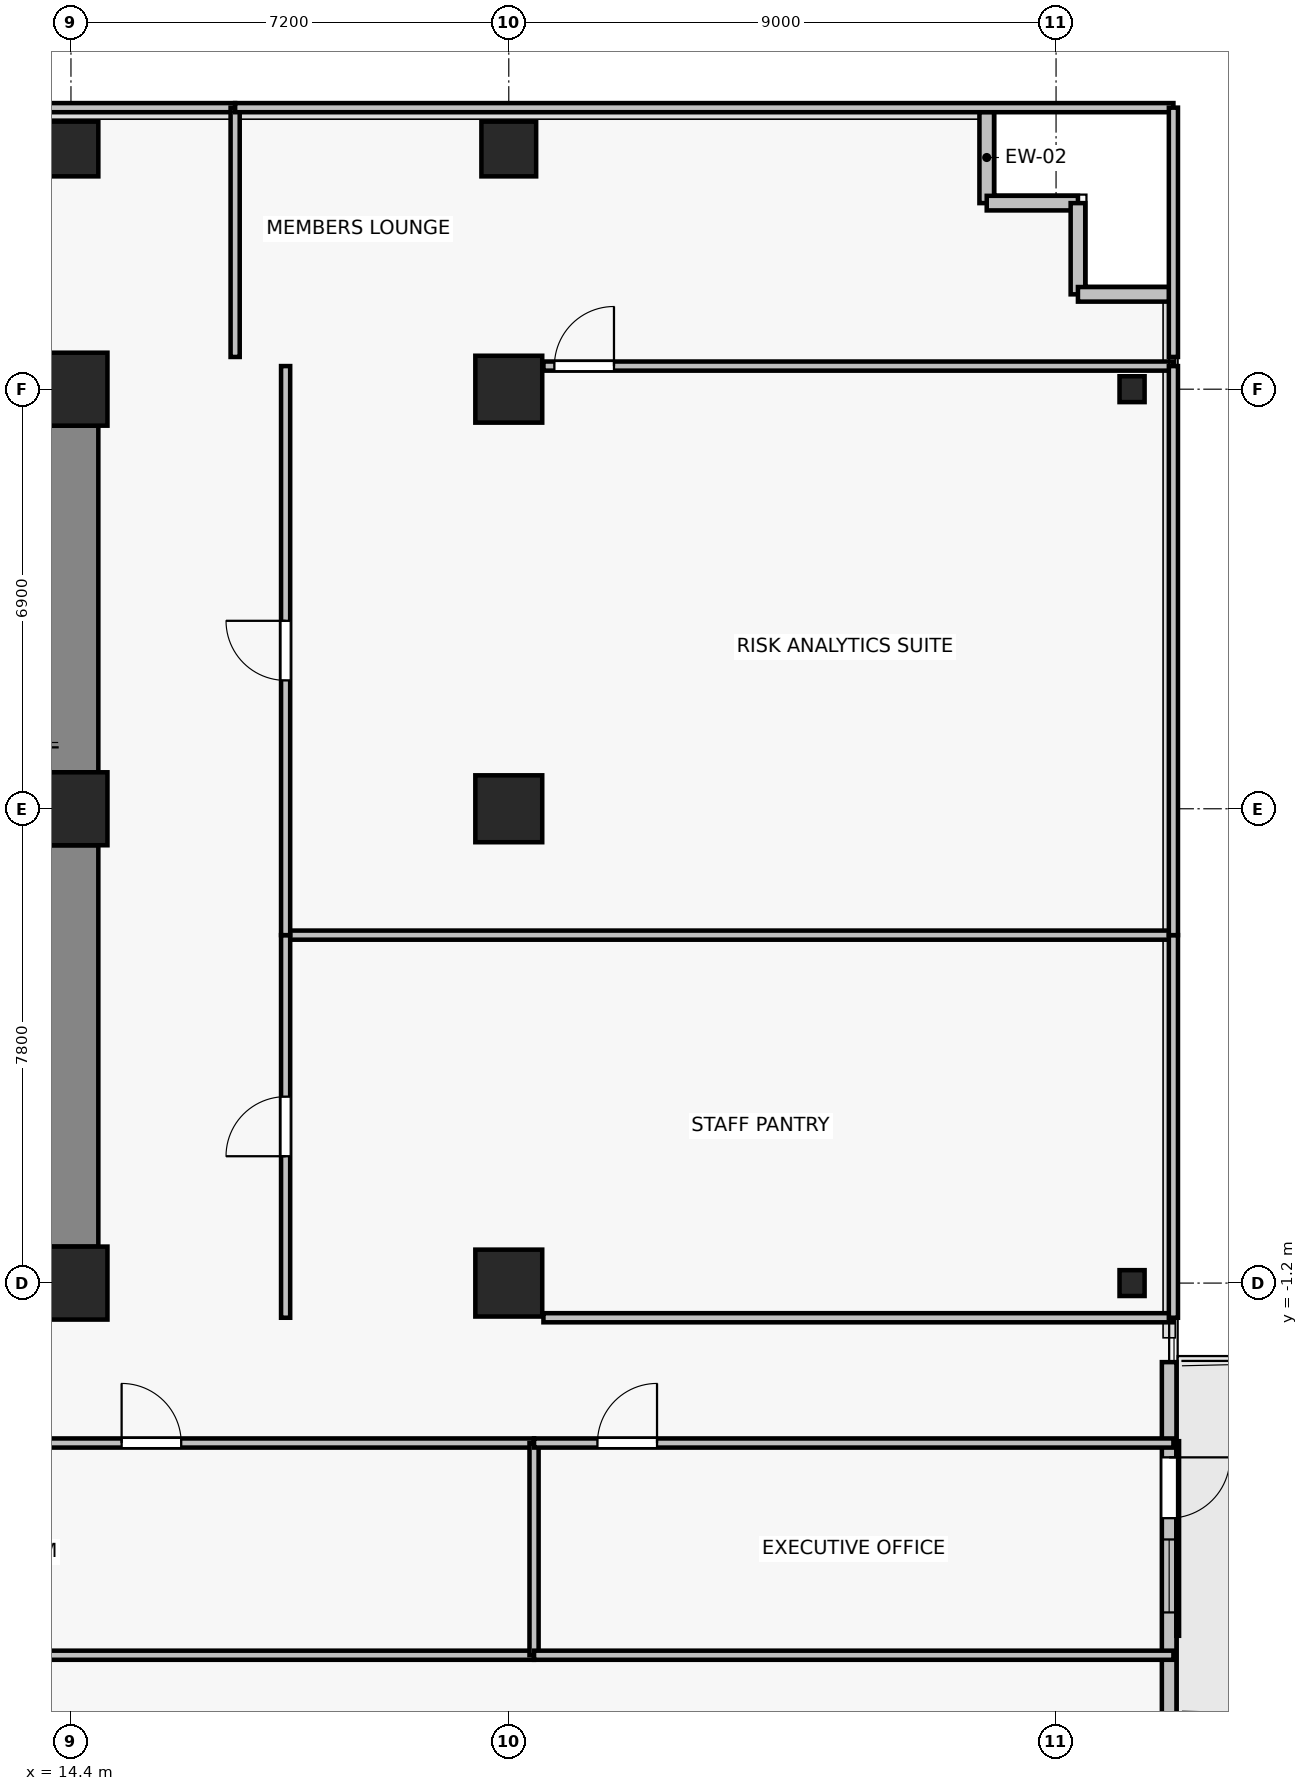
"""IFC4 building model, lengths in metres.
Left out: names, types, materials, properties, quantities, classifications, styles, units other than length and angle.
Written with IfcOpenShell. Run it as: python <this file> out.ifc"""

import sys

from ifc_helpers import new_model, si_unit, direction, frame, frame_2d, origin, origin_2d, place, context, subcontext, project, spatial, rectangle, i_section, extrude, source, transform, mapped, element, fill, save


model = new_model("IFC4")
c1 = context("Model", 3, precision=1e-05, world=origin(), true_north=direction((0.0, 1.0)))
c2 = subcontext(c1, "Body", "Model", "MODEL_VIEW")
j1 = project(units=[si_unit("LENGTHUNIT", "METRE"), si_unit("PLANEANGLEUNIT", "RADIAN")], contexts=[c1])
p1 = place(None, origin())
s1 = spatial("IfcSite", under=j1, at=p1, CompositionType="ELEMENT")
p2 = place(p1, origin())
s2 = spatial("IfcBuilding", under=s1, at=p2, CompositionType="ELEMENT")
p3 = place(p2, frame((0.0, 0.0, 70.3)))
s3 = spatial("IfcBuildingStorey", under=s2, at=p3, CompositionType="ELEMENT", Elevation=70.3)
for number, where, z_axis, x_axis in (
    (1, (14.4, -1.2, 0.0), (0.0, 0.0, 1.0), (1.0, 0.0, 0.0)),
    (2, (14.4, 6.6, 0.0), (0.0, 0.0, 1.0), (1.0, 0.0, 0.0)),
    (3, (14.4, 13.5, 0.0), (0.0, 0.0, 1.0), (1.0, 0.0, 0.0)),
):
    element("IfcColumn", number, at=place(p3, frame(where, z_axis=z_axis, x_axis=x_axis)), inside=s3, PredefinedType="COLUMN", context=c2, shape_type="SweptSolid", body=[
        extrude(rectangle(XDim=1.2, YDim=1.2, at=origin_2d()), origin(), (0.0, 0.0, 1.0), 3.3),
    ])
for number, where, z_axis, x_axis in (
    (4, (21.6, -1.2, 0.0), (0.0, 0.0, 1.0), (1.0, 0.0, 0.0)),
    (5, (21.6, 6.6, 0.0), (0.0, 0.0, 1.0), (1.0, 0.0, 0.0)),
    (6, (21.6, 13.5, 0.0), (0.0, 0.0, 1.0), (1.0, 0.0, 0.0)),
):
    element("IfcColumn", number, at=place(p3, frame(where, z_axis=z_axis, x_axis=x_axis)), inside=s3, PredefinedType="COLUMN", context=c2, shape_type="SweptSolid", body=[
        extrude(rectangle(XDim=1.1, YDim=1.1, at=origin_2d()), origin(), (0.0, 0.0, 1.0), 3.3),
    ])
for number, where, z_axis, x_axis in (
    (7, (14.4, 17.45, 0.0), (0.0, 0.0, 1.0), (1.0, 0.0, 0.0)),
    (8, (21.6, 17.45, 0.0), (0.0, 0.0, 1.0), (1.0, 0.0, 0.0)),
):
    element("IfcColumn", number, at=place(p3, frame(where, z_axis=z_axis, x_axis=x_axis)), inside=s3, PredefinedType="COLUMN", context=c2, shape_type="SweptSolid", body=[
        extrude(rectangle(XDim=0.9, YDim=0.9, at=origin_2d()), origin(), (0.0, 0.0, 1.0), 3.3),
    ])
for number, where, z_axis, x_axis in (
    (9, (31.85, -1.2, 0.0), (0.0, 0.0, 1.0), (1.0, 0.0, 0.0)),
    (10, (31.85, 13.5, 0.0), (0.0, 0.0, 1.0), (1.0, 0.0, 0.0)),
):
    element("IfcColumn", number, at=place(p3, frame(where, z_axis=z_axis, x_axis=x_axis)), inside=s3, PredefinedType="COLUMN", context=c2, shape_type="SweptSolid", body=[
        extrude(i_section(OverallWidth=0.412, OverallDepth=0.425, WebThickness=0.026, FlangeThickness=0.039, FilletRadius=0.015, at=origin_2d()), origin(), (0.0, 0.0, 1.0), 3.3),
    ])
p4 = place(p3, frame((14.4, -0.6, 0.0), z_axis=(0.0, 0.0, 1.0), x_axis=(0.0, 1.0, 0.0)))
e11 = element("IfcWall", 11, at=p4, inside=s3, PredefinedType="SHEAR", context=c2, shape_type="SweptSolid", body=[
    extrude(rectangle(XDim=6.6, YDim=0.9, at=frame_2d((3.3, 0.0))), origin(), (0.0, 0.0, 1.0), 3.075),
])
p5 = place(p3, frame((14.4, 7.2, 0.0), z_axis=(0.0, 0.0, 1.0), x_axis=(0.0, 1.0, 0.0)))
e12 = element("IfcWall", 12, at=p5, inside=s3, PredefinedType="SHEAR", context=c2, shape_type="SweptSolid", body=[
    extrude(rectangle(XDim=5.7, YDim=0.9, at=frame_2d((2.85, 0.0))), origin(), (0.0, 0.0, 1.0), 3.075),
])
p6 = place(p3, frame((32.46, -2.5, 0.0), z_axis=(0.0, 0.0, 1.0), x_axis=(0.0, -1.0, 0.0)))
e13 = element("IfcWall", 13, at=p6, inside=s3, PredefinedType="SOLIDWALL", context=c2, shape_type="SweptSolid", body=[
    extrude(rectangle(XDim=5.8, YDim=0.24, at=frame_2d((2.9, 0.0))), origin(), (0.0, 0.0, 1.0), 3.075),
])
p7 = place(p6, frame((1.566, 0.0, 0.0)))
e14 = element("IfcOpeningElement", 14, at=p7, cuts=e13, PredefinedType="OPENING", context=c2, shape_type="SweptSolid", body=[
    extrude(rectangle(XDim=1.0, YDim=2.2, at=frame_2d((0.5, 1.1))), frame((0.0, 0.13, 0.0), z_axis=(0.0, -1.0, 0.0), x_axis=(1.0, 0.0, 0.0)), (0.0, 0.0, 1.0), 0.26),
])
p8 = place(p6, frame((2.916, 0.0, 0.85)))
e15 = element("IfcOpeningElement", 15, at=p8, cuts=e13, PredefinedType="OPENING", context=c2, shape_type="SweptSolid", body=[
    extrude(rectangle(XDim=1.2, YDim=1.5, at=frame_2d((0.6, 0.75))), frame((0.0, 0.13, 0.0), z_axis=(0.0, -1.0, 0.0), x_axis=(1.0, 0.0, 0.0)), (0.0, 0.0, 1.0), 0.26),
])
for number, where, z_axis, x_axis in (
    (16, (29.46, 16.56, 0.0), (0.0, 0.0, 1.0), (0.0, 1.0, 0.0)),
    (17, (30.96, 16.56, 0.0), (0.0, 0.0, 1.0), (-1.0, 0.0, 0.0)),
    (18, (30.96, 15.06, 0.0), (0.0, 0.0, 1.0), (0.0, 1.0, 0.0)),
    (19, (32.46, 15.06, 0.0), (0.0, 0.0, 1.0), (-1.0, 0.0, 0.0)),
):
    element("IfcWall", number, at=place(p3, frame(where, z_axis=z_axis, x_axis=x_axis)), inside=s3, PredefinedType="SOLIDWALL", context=c2, shape_type="SweptSolid", body=[
        extrude(rectangle(XDim=1.5, YDim=0.24, at=frame_2d((0.75, 0.0))), origin(), (0.0, 0.0, 1.0), 3.075),
    ])
p9 = place(p3, frame((22.015, -7.32, 0.0), z_axis=(0.0, 0.0, 1.0), x_axis=(-1.0, 0.0, 0.0)))
e20 = element("IfcWall", 20, at=p9, inside=s3, PredefinedType="PARTITIONING", context=c2, shape_type="SweptSolid", body=[
    extrude(rectangle(XDim=12.585, YDim=0.15, at=frame_2d((6.293, 0.0))), origin(), (0.0, 0.0, 1.0), 2.465),
])
p10 = place(p9, frame((11.426, 0.0, 0.0)))
e21 = element("IfcOpeningElement", 21, at=p10, cuts=e20, PredefinedType="OPENING", context=c2, shape_type="SweptSolid", body=[
    extrude(rectangle(XDim=0.98, YDim=2.15, at=frame_2d((0.49, 1.075))), frame((0.0, 0.085, 0.0), z_axis=(0.0, -1.0, 0.0), x_axis=(1.0, 0.0, 0.0)), (0.0, 0.0, 1.0), 0.17),
])
p11 = place(p3, frame((9.43, -3.83, 0.0), z_axis=(0.0, 0.0, 1.0), x_axis=(1.0, 0.0, 0.0)))
e22 = element("IfcWall", 22, at=p11, inside=s3, PredefinedType="PARTITIONING", context=c2, shape_type="SweptSolid", body=[
    extrude(rectangle(XDim=12.585, YDim=0.15, at=frame_2d((6.293, 0.0))), origin(), (0.0, 0.0, 1.0), 2.465),
])
p12 = place(p11, frame((5.803, 0.0, 0.0)))
e23 = element("IfcOpeningElement", 23, at=p12, cuts=e22, PredefinedType="OPENING", context=c2, shape_type="SweptSolid", body=[
    extrude(rectangle(XDim=0.98, YDim=2.15, at=frame_2d((0.49, 1.075))), frame((0.0, 0.085, 0.0), z_axis=(0.0, -1.0, 0.0), x_axis=(1.0, 0.0, 0.0)), (0.0, 0.0, 1.0), 0.17),
])
p13 = place(p3, frame((22.015, -3.83, 0.0), z_axis=(0.0, 0.0, 1.0), x_axis=(0.0, -1.0, 0.0)))
e24 = element("IfcWall", 24, at=p13, inside=s3, PredefinedType="PARTITIONING", context=c2, shape_type="SweptSolid", body=[
    extrude(rectangle(XDim=3.49, YDim=0.15, at=frame_2d((1.745, 0.0))), origin(), (0.0, 0.0, 1.0), 2.565),
])
p14 = place(p3, frame((32.53, -7.32, 0.0), z_axis=(0.0, 0.0, 1.0), x_axis=(-1.0, 0.0, 0.0)))
e25 = element("IfcWall", 25, at=p14, inside=s3, PredefinedType="PARTITIONING", context=c2, shape_type="SweptSolid", body=[
    extrude(rectangle(XDim=10.515, YDim=0.15, at=frame_2d((5.257, 0.0))), origin(), (0.0, 0.0, 1.0), 2.465),
])
p15 = place(p3, frame((22.015, -3.83, 0.0), z_axis=(0.0, 0.0, 1.0), x_axis=(1.0, 0.0, 0.0)))
e26 = element("IfcWall", 26, at=p15, inside=s3, PredefinedType="PARTITIONING", context=c2, shape_type="SweptSolid", body=[
    extrude(rectangle(XDim=10.515, YDim=0.15, at=frame_2d((5.257, 0.0))), origin(), (0.0, 0.0, 1.0), 2.465),
])
p16 = place(p15, frame((1.042, 0.0, 0.0)))
e27 = element("IfcOpeningElement", 27, at=p16, cuts=e26, PredefinedType="OPENING", context=c2, shape_type="SweptSolid", body=[
    extrude(rectangle(XDim=0.98, YDim=2.15, at=frame_2d((0.49, 1.075))), frame((0.0, 0.085, 0.0), z_axis=(0.0, -1.0, 0.0), x_axis=(1.0, 0.0, 0.0)), (0.0, 0.0, 1.0), 0.17),
])
p17 = place(p3, frame((32.53, -1.77, 0.0), z_axis=(0.0, 0.0, 1.0), x_axis=(-1.0, 0.0, 0.0)))
e28 = element("IfcWall", 28, at=p17, inside=s3, PredefinedType="PARTITIONING", context=c2, shape_type="SweptSolid", body=[
    extrude(rectangle(XDim=10.36, YDim=0.15, at=frame_2d((5.18, 0.0))), origin(), (0.0, 0.0, 1.0), 2.465),
])
p18 = place(p3, frame((17.93, 4.522, 0.0), z_axis=(0.0, 0.0, 1.0), x_axis=(1.0, 0.0, 0.0)))
e29 = element("IfcWall", 29, at=p18, inside=s3, PredefinedType="PARTITIONING", context=c2, shape_type="SweptSolid", body=[
    extrude(rectangle(XDim=14.6, YDim=0.15, at=frame_2d((7.3, 0.0))), origin(), (0.0, 0.0, 1.0), 2.465),
])
p19 = place(p3, frame((17.93, -1.77, 0.0), z_axis=(0.0, 0.0, 1.0), x_axis=(0.0, 1.0, 0.0)))
e30 = element("IfcWall", 30, at=p19, inside=s3, PredefinedType="PARTITIONING", context=c2, shape_type="SweptSolid", body=[
    extrude(rectangle(XDim=6.292, YDim=0.15, at=frame_2d((3.146, 0.0))), origin(), (0.0, 0.0, 1.0), 2.465),
])
p20 = place(p19, frame((2.656, 0.0, 0.0)))
e31 = element("IfcOpeningElement", 31, at=p20, cuts=e30, PredefinedType="OPENING", context=c2, shape_type="SweptSolid", body=[
    extrude(rectangle(XDim=0.98, YDim=2.15, at=frame_2d((0.49, 1.075))), frame((0.0, 0.085, 0.0), z_axis=(0.0, -1.0, 0.0), x_axis=(1.0, 0.0, 0.0)), (0.0, 0.0, 1.0), 0.17),
])
p21 = place(p3, frame((32.53, 4.522, 0.0), z_axis=(0.0, 0.0, 1.0), x_axis=(0.0, -1.0, 0.0)))
e32 = element("IfcWall", 32, at=p21, inside=s3, PredefinedType="PARTITIONING", context=c2, shape_type="SweptSolid", body=[
    extrude(rectangle(XDim=6.292, YDim=0.15, at=frame_2d((3.146, 0.0))), origin(), (0.0, 0.0, 1.0), 3.075),
])
p22 = place(p3, frame((22.17, 13.88, 0.0), z_axis=(0.0, 0.0, 1.0), x_axis=(1.0, 0.0, 0.0)))
e33 = element("IfcWall", 33, at=p22, inside=s3, PredefinedType="PARTITIONING", context=c2, shape_type="SweptSolid", body=[
    extrude(rectangle(XDim=10.36, YDim=0.15, at=frame_2d((5.18, 0.0))), origin(), (0.0, 0.0, 1.0), 3.075),
])
p23 = place(p22, frame((0.18, 0.0, 0.0)))
e34 = element("IfcOpeningElement", 34, at=p23, cuts=e33, PredefinedType="OPENING", context=c2, shape_type="SweptSolid", body=[
    extrude(rectangle(XDim=0.98, YDim=2.15, at=frame_2d((0.49, 1.075))), frame((0.0, 0.085, 0.0), z_axis=(0.0, -1.0, 0.0), x_axis=(1.0, 0.0, 0.0)), (0.0, 0.0, 1.0), 0.17),
])
p24 = place(p3, frame((17.93, 4.522, 0.0), z_axis=(0.0, 0.0, 1.0), x_axis=(0.0, 1.0, 0.0)))
e35 = element("IfcWall", 35, at=p24, inside=s3, PredefinedType="PARTITIONING", context=c2, shape_type="SweptSolid", body=[
    extrude(rectangle(XDim=9.358, YDim=0.15, at=frame_2d((4.679, 0.0))), origin(), (0.0, 0.0, 1.0), 2.465),
])
p25 = place(p24, frame((4.189, 0.0, 0.0)))
e36 = element("IfcOpeningElement", 36, at=p25, cuts=e35, PredefinedType="OPENING", context=c2, shape_type="SweptSolid", body=[
    extrude(rectangle(XDim=0.98, YDim=2.15, at=frame_2d((0.49, 1.075))), frame((0.0, 0.085, 0.0), z_axis=(0.0, -1.0, 0.0), x_axis=(1.0, 0.0, 0.0)), (0.0, 0.0, 1.0), 0.17),
])
p26 = place(p3, frame((32.53, 13.88, 0.0), z_axis=(0.0, 0.0, 1.0), x_axis=(0.0, -1.0, 0.0)))
e37 = element("IfcWall", 37, at=p26, inside=s3, PredefinedType="PARTITIONING", context=c2, shape_type="SweptSolid", body=[
    extrude(rectangle(XDim=9.358, YDim=0.15, at=frame_2d((4.679, 0.0))), origin(), (0.0, 0.0, 1.0), 3.075),
])
p27 = place(p3, frame((-28.53, 18.13, 0.0), z_axis=(0.0, 0.0, 1.0), x_axis=(1.0, 0.0, 0.0)))
e38 = element("IfcWall", 38, at=p27, inside=s3, PredefinedType="PARTITIONING", context=c2, shape_type="SweptSolid", body=[
    extrude(rectangle(XDim=45.63, YDim=0.15, at=frame_2d((22.815, 0.0))), origin(), (0.0, 0.0, 1.0), 3.075),
])
p28 = place(p3, frame((17.1, 18.13, 0.0), z_axis=(0.0, 0.0, 1.0), x_axis=(0.0, -1.0, 0.0)))
e39 = element("IfcWall", 39, at=p28, inside=s3, PredefinedType="PARTITIONING", context=c2, shape_type="SweptSolid", body=[
    extrude(rectangle(XDim=4.1, YDim=0.15, at=frame_2d((2.05, 0.0))), origin(), (0.0, 0.0, 1.0), 2.465),
])
p29 = place(p3, frame((17.1, 18.13, 0.0), z_axis=(0.0, 0.0, 1.0), x_axis=(1.0, 0.0, 0.0)))
e40 = element("IfcWall", 40, at=p29, inside=s3, PredefinedType="PARTITIONING", context=c2, shape_type="SweptSolid", body=[
    extrude(rectangle(XDim=15.43, YDim=0.15, at=frame_2d((7.715, 0.0))), origin(), (0.0, 0.0, 1.0), 3.075),
])
p30 = place(p3, frame((32.53, 18.13, 0.0), z_axis=(0.0, 0.0, 1.0), x_axis=(0.0, -1.0, 0.0)))
e41 = element("IfcWall", 41, at=p30, inside=s3, PredefinedType="PARTITIONING", context=c2, shape_type="SweptSolid", body=[
    extrude(rectangle(XDim=4.1, YDim=0.15, at=frame_2d((2.05, 0.0))), origin(), (0.0, 0.0, 1.0), 3.075),
])
m1 = source(origin(), c2, "Body", "SweptSolid", [
    extrude(rectangle(XDim=1.0, YDim=2.2, at=frame_2d((0.5, 1.1))), frame((0.0, 0.025, 0.0), z_axis=(0.0, -1.0, 0.0), x_axis=(1.0, 0.0, 0.0)), (0.0, 0.0, 1.0), 0.05),
])
p31 = place(p7, origin())
e42 = element("IfcDoor", 42, at=p31, inside=s3, OperationType="SINGLE_SWING_LEFT", PredefinedType="DOOR", context=c2, shape_type="MappedRepresentation", body=[
    mapped(m1, transform((0.0, 0.0, 0.0), x_axis=(1.0, 0.0, 0.0), y_axis=(0.0, 1.0, 0.0), z_axis=(0.0, 0.0, 1.0), scale=1.0)),
])
fill(e14, e42)
m2 = source(origin(), c2, "Body", "SweptSolid", [
    extrude(rectangle(XDim=1.2, YDim=1.5, at=frame_2d((0.6, 0.75))), frame((0.0, 0.03, 0.0), z_axis=(0.0, -1.0, 0.0), x_axis=(1.0, 0.0, 0.0)), (0.0, 0.0, 1.0), 0.06),
])
p32 = place(p8, origin())
e43 = element("IfcWindow", 43, at=p32, inside=s3, PartitioningType="SINGLE_PANEL", PredefinedType="WINDOW", context=c2, shape_type="MappedRepresentation", body=[
    mapped(m2, transform((0.0, 0.0, 0.0), x_axis=(1.0, 0.0, 0.0), y_axis=(0.0, 1.0, 0.0), z_axis=(0.0, 0.0, 1.0), scale=1.0)),
])
fill(e15, e43)
m3 = source(origin(), c2, "Body", "SweptSolid", [
    extrude(rectangle(XDim=0.98, YDim=2.15, at=frame_2d((0.49, 1.075))), frame((0.0, 0.025, 0.0), z_axis=(0.0, -1.0, 0.0), x_axis=(1.0, 0.0, 0.0)), (0.0, 0.0, 1.0), 0.05),
])
p33 = place(p12, origin())
e44 = element("IfcDoor", 44, at=p33, inside=s3, OperationType="SINGLE_SWING_LEFT", PredefinedType="DOOR", context=c2, shape_type="MappedRepresentation", body=[
    mapped(m3, transform((0.0, 0.0, 0.0), x_axis=(1.0, 0.0, 0.0), y_axis=(0.0, 1.0, 0.0), z_axis=(0.0, 0.0, 1.0), scale=1.0)),
])
fill(e23, e44)
p34 = place(p16, origin())
e45 = element("IfcDoor", 45, at=p34, inside=s3, OperationType="SINGLE_SWING_RIGHT", PredefinedType="DOOR", context=c2, shape_type="MappedRepresentation", body=[
    mapped(m3, transform((0.0, 0.0, 0.0), x_axis=(1.0, 0.0, 0.0), y_axis=(0.0, 1.0, 0.0), z_axis=(0.0, 0.0, 1.0), scale=1.0)),
])
fill(e27, e45)
p35 = place(p20, origin())
e46 = element("IfcDoor", 46, at=p35, inside=s3, OperationType="SINGLE_SWING_LEFT", PredefinedType="DOOR", context=c2, shape_type="MappedRepresentation", body=[
    mapped(m3, transform((0.0, 0.0, 0.0), x_axis=(1.0, 0.0, 0.0), y_axis=(0.0, 1.0, 0.0), z_axis=(0.0, 0.0, 1.0), scale=1.0)),
])
fill(e31, e46)
p36 = place(p25, origin())
e47 = element("IfcDoor", 47, at=p36, inside=s3, OperationType="SINGLE_SWING_RIGHT", PredefinedType="DOOR", context=c2, shape_type="MappedRepresentation", body=[
    mapped(m3, transform((0.0, 0.0, 0.0), x_axis=(1.0, 0.0, 0.0), y_axis=(0.0, 1.0, 0.0), z_axis=(0.0, 0.0, 1.0), scale=1.0)),
])
fill(e36, e47)
p37 = place(p23, origin())
e48 = element("IfcDoor", 48, at=p37, inside=s3, OperationType="SINGLE_SWING_RIGHT", PredefinedType="DOOR", context=c2, shape_type="MappedRepresentation", body=[
    mapped(m3, transform((0.0, 0.0, 0.0), x_axis=(1.0, 0.0, 0.0), y_axis=(0.0, 1.0, 0.0), z_axis=(0.0, 0.0, 1.0), scale=1.0)),
])
fill(e34, e48)
save(model, sys.argv[1])
